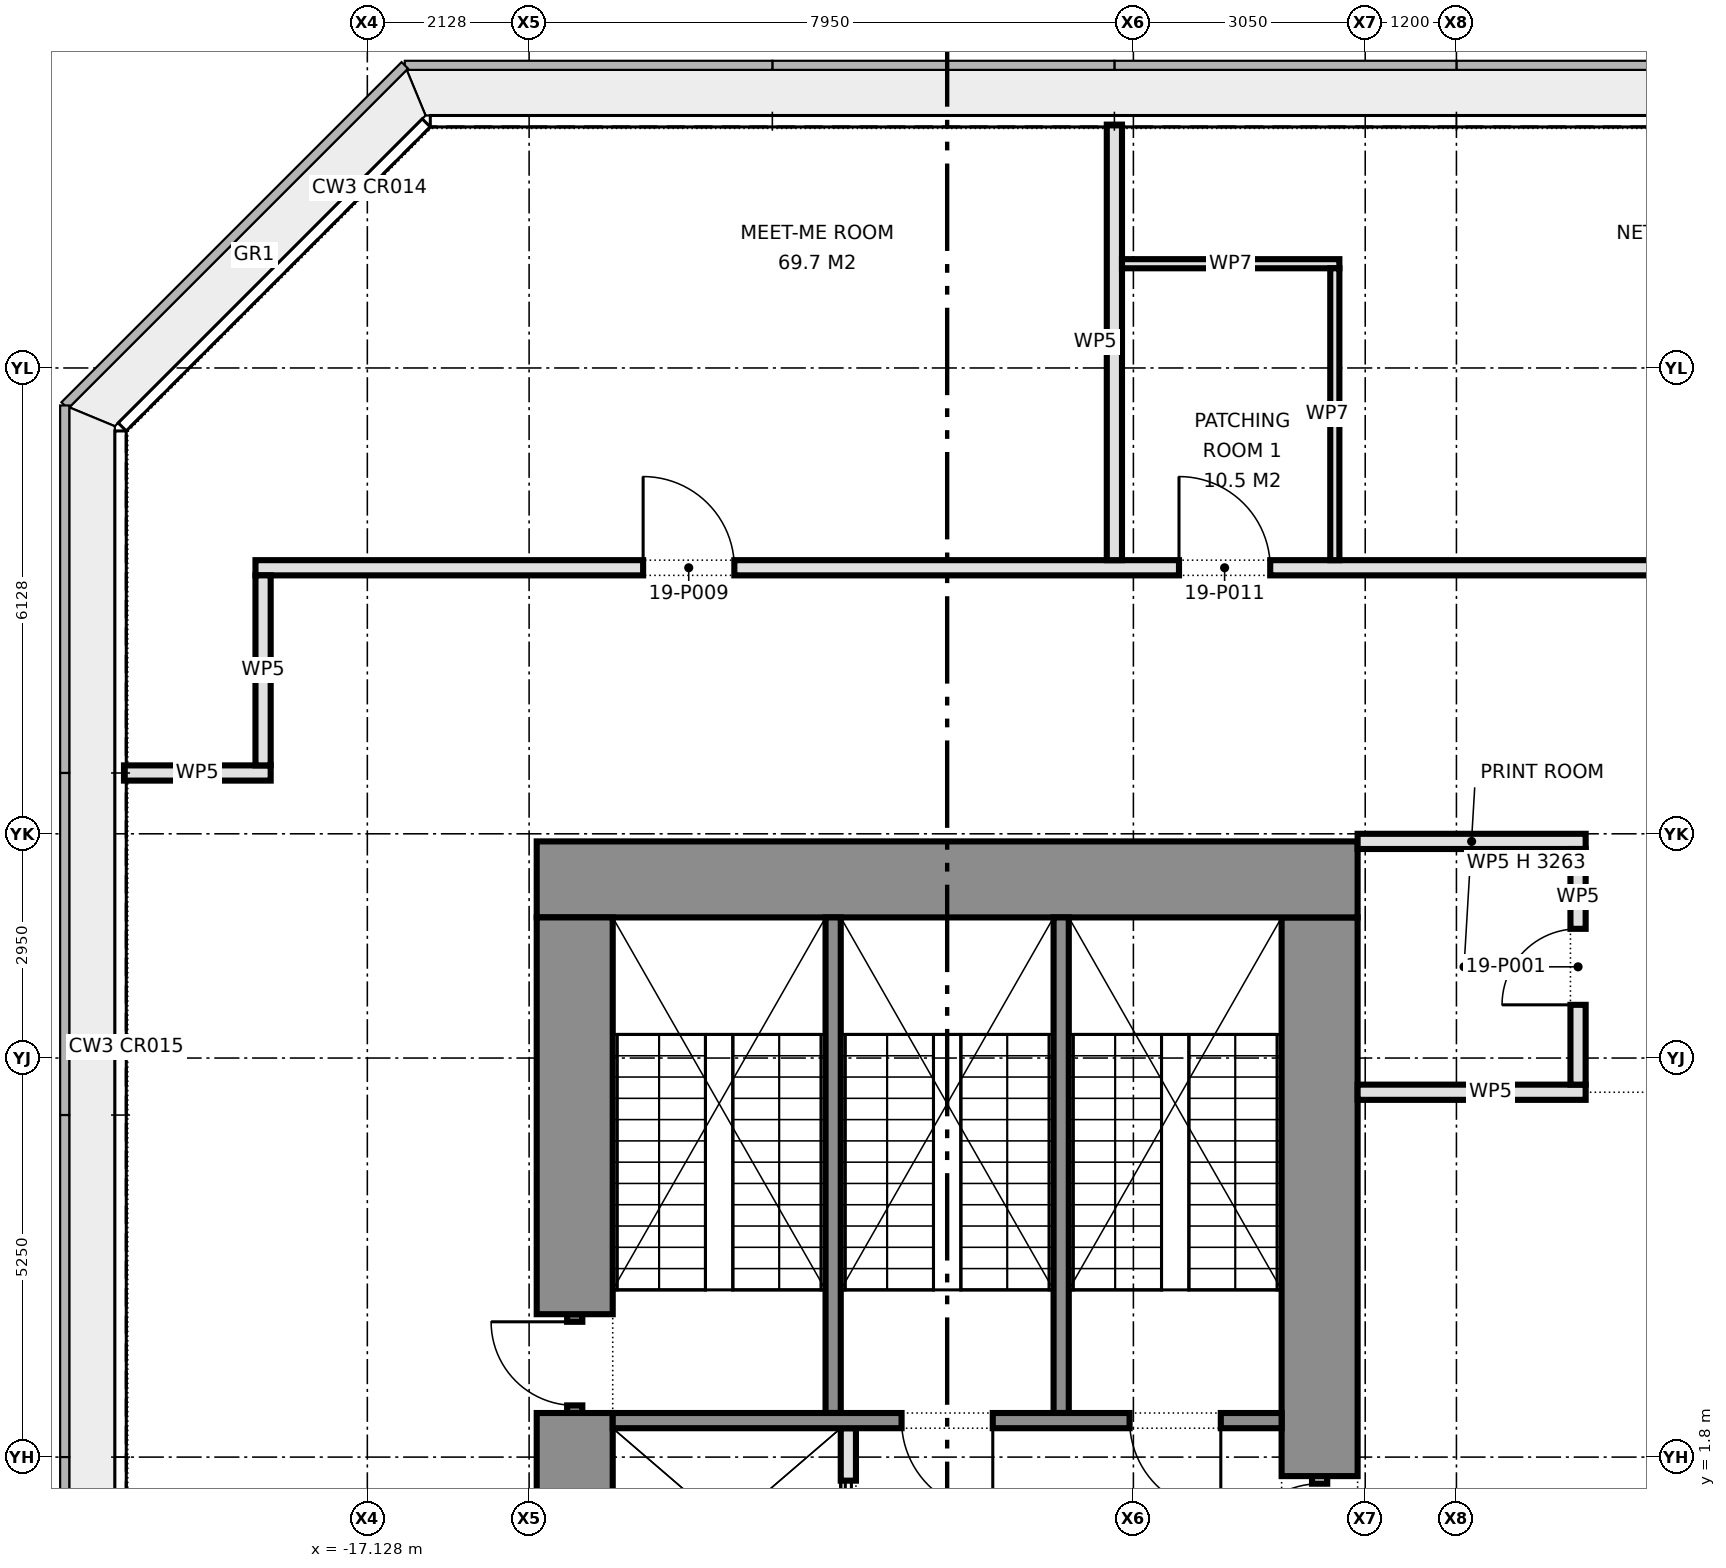
"""IFC4 building model, lengths in metres.
Left out: names, types, materials, properties, quantities, classifications, styles, units other than length and angle.
Written with IfcOpenShell. Run it as: python <this file> out.ifc"""

import sys

from ifc_helpers import new_model, si_unit, direction, frame, frame_2d, origin, place, context, subcontext, project, spatial, rectangle, extrude, element, fill, save


model = new_model("IFC4")
c1 = context("Model", 3, precision=1e-05, world=origin(), true_north=direction((0.0, 1.0)))
c2 = subcontext(c1, "Body", "Model", "MODEL_VIEW")
j1 = project(units=[si_unit("LENGTHUNIT", "METRE"), si_unit("PLANEANGLEUNIT", "RADIAN")], contexts=[c1])
p1 = place(None, origin())
s1 = spatial("IfcSite", under=j1, at=p1, CompositionType="ELEMENT")
p2 = place(p1, origin())
s2 = spatial("IfcBuilding", under=s1, at=p2, CompositionType="ELEMENT")
p3 = place(p2, frame((0.0, 0.0, 86.4)))
s3 = spatial("IfcBuildingStorey", under=s2, at=p3, CompositionType="ELEMENT", Elevation=86.4)
p4 = place(p3, frame((-14.9, 9.4, 0.0), z_axis=(0.0, 0.0, 1.0), x_axis=(1.0, 0.0, 0.0)))
e1 = element("IfcWall", 1, at=p4, inside=s3, PredefinedType="SHEAR", context=c2, shape_type="SweptSolid", body=[
    extrude(rectangle(XDim=10.8, YDim=1.0, at=frame_2d((5.4, 0.0))), origin(), (0.0, 0.0, 1.0), 4.2),
])
p5 = place(p3, frame((-14.4, -3.75, 0.0), z_axis=(0.0, 0.0, 1.0), x_axis=(0.0, 1.0, 0.0)))
e2 = element("IfcWall", 2, at=p5, inside=s3, PredefinedType="SHEAR", context=c2, shape_type="SweptSolid", body=[
    extrude(rectangle(XDim=6.13, YDim=1.0, at=frame_2d((3.065, 0.0))), origin(), (0.0, 0.0, 1.0), 4.2),
])
p6 = place(p3, frame((-14.4, 2.38, 0.0), z_axis=(0.0, 0.0, 1.0), x_axis=(0.0, 1.0, 0.0)))
e3 = element("IfcWall", 3, at=p6, inside=s3, PredefinedType="SHEAR", context=c2, shape_type="SweptSolid", body=[
    extrude(rectangle(XDim=1.3, YDim=0.2, at=frame_2d((0.65, 0.0))), origin(), (0.0, 0.0, 1.0), 2.4),
])
p7 = place(p6, frame((0.1, 0.0, 0.0)))
e4 = element("IfcOpeningElement", 4, at=p7, cuts=e3, PredefinedType="OPENING", context=c2, shape_type="SweptSolid", body=[
    extrude(rectangle(XDim=1.1, YDim=2.1, at=frame_2d((0.55, 1.05))), frame((0.0, 0.11, 0.0), z_axis=(0.0, -1.0, 0.0), x_axis=(1.0, 0.0, 0.0)), (0.0, 0.0, 1.0), 0.22),
])
p8 = place(p3, frame((-14.4, 3.68, 0.0), z_axis=(0.0, 0.0, 1.0), x_axis=(0.0, 1.0, 0.0)))
e5 = element("IfcWall", 5, at=p8, inside=s3, PredefinedType="SHEAR", context=c2, shape_type="SweptSolid", body=[
    extrude(rectangle(XDim=5.22, YDim=1.0, at=frame_2d((2.61, 0.0))), origin(), (0.0, 0.0, 1.0), 4.2),
])
p9 = place(p3, frame((-4.6, 0.25, 0.0), z_axis=(0.0, 0.0, 1.0), x_axis=(0.0, 1.0, 0.0)))
e6 = element("IfcWall", 6, at=p9, inside=s3, PredefinedType="PARTITIONING", context=c2, shape_type="SweptSolid", body=[
    extrude(rectangle(XDim=1.3, YDim=0.2, at=frame_2d((0.65, 0.0))), origin(), (0.0, 0.0, 1.0), 2.4),
])
p10 = place(p9, frame((0.1, 0.0, 0.0)))
e7 = element("IfcOpeningElement", 7, at=p10, cuts=e6, PredefinedType="OPENING", context=c2, shape_type="SweptSolid", body=[
    extrude(rectangle(XDim=1.1, YDim=2.1, at=frame_2d((0.55, 1.05))), frame((0.0, 0.11, 0.0), z_axis=(0.0, -1.0, 0.0), x_axis=(1.0, 0.0, 0.0)), (0.0, 0.0, 1.0), 0.22),
])
p11 = place(p3, frame((-4.6, 1.55, 0.0), z_axis=(0.0, 0.0, 1.0), x_axis=(0.0, 1.0, 0.0)))
e8 = element("IfcWall", 8, at=p11, inside=s3, PredefinedType="SHEAR", context=c2, shape_type="SweptSolid", body=[
    extrude(rectangle(XDim=7.35, YDim=1.0, at=frame_2d((3.675, 0.0))), origin(), (0.0, 0.0, 1.0), 4.2),
])
p12 = place(p3, frame((-10.8, -0.4, 0.0), z_axis=(0.0, 0.0, 1.0), x_axis=(0.0, 1.0, 0.0)))
e9 = element("IfcWall", 9, at=p12, inside=s3, PredefinedType="PARTITIONING", context=c2, shape_type="SweptSolid", body=[
    extrude(rectangle(XDim=2.58, YDim=0.2, at=frame_2d((1.29, 0.0))), origin(), (0.0, 0.0, 1.0), 4.2),
])
p13 = place(p12, frame((0.69, 0.0, 0.0)))
e10 = element("IfcOpeningElement", 10, at=p13, cuts=e9, PredefinedType="OPENING", context=c2, shape_type="SweptSolid", body=[
    extrude(rectangle(XDim=1.2, YDim=2.1, at=frame_2d((0.6, 1.05))), frame((0.0, 0.11, 0.0), z_axis=(0.0, -1.0, 0.0), x_axis=(1.0, 0.0, 0.0)), (0.0, 0.0, 1.0), 0.22),
])
p14 = place(p3, frame((-13.9, 2.28, 0.0), z_axis=(0.0, 0.0, 1.0), x_axis=(1.0, 0.0, 0.0)))
e11 = element("IfcWall", 11, at=p14, inside=s3, PredefinedType="SHEAR", context=c2, shape_type="SweptSolid", body=[
    extrude(rectangle(XDim=8.8, YDim=0.2, at=frame_2d((4.4, 0.0))), origin(), (0.0, 0.0, 1.0), 4.2),
])
p15 = place(p14, frame((3.8, 0.0, 0.0)))
e12 = element("IfcOpeningElement", 12, at=p15, cuts=e11, PredefinedType="OPENING", context=c2, shape_type="SweptSolid", body=[
    extrude(rectangle(XDim=1.2, YDim=2.1, at=frame_2d((0.6, 1.05))), frame((0.0, 0.11, 0.0), z_axis=(0.0, -1.0, 0.0), x_axis=(1.0, 0.0, 0.0)), (0.0, 0.0, 1.0), 0.22),
])
p16 = place(p14, frame((6.8, 0.0, 0.0)))
e13 = element("IfcOpeningElement", 13, at=p16, cuts=e11, PredefinedType="OPENING", context=c2, shape_type="SweptSolid", body=[
    extrude(rectangle(XDim=1.2, YDim=2.1, at=frame_2d((0.6, 1.05))), frame((0.0, 0.11, 0.0), z_axis=(0.0, -1.0, 0.0), x_axis=(1.0, 0.0, 0.0)), (0.0, 0.0, 1.0), 0.22),
])
for number, where, z_axis, x_axis in (
    (14, (-11.0, 2.38, 0.0), (0.0, 0.0, 1.0), (0.0, 1.0, 0.0)),
    (15, (-8.0, 2.38, 0.0), (0.0, 0.0, 1.0), (0.0, 1.0, 0.0)),
):
    element("IfcWall", number, at=place(p3, frame(where, z_axis=z_axis, x_axis=x_axis)), inside=s3, PredefinedType="SHEAR", context=c2, shape_type="SweptSolid", body=[
        extrude(rectangle(XDim=6.52, YDim=0.2, at=frame_2d((3.26, 0.0))), origin(), (0.0, 0.0, 1.0), 4.2),
    ])
p17 = place(p3, frame((-4.1, 6.6, 0.0), z_axis=(0.0, 0.0, 1.0), x_axis=(1.0, 0.0, 0.0)))
e16 = element("IfcWall", 16, at=p17, inside=s3, PredefinedType="PARTITIONING", context=c2, shape_type="SweptSolid", body=[
    extrude(rectangle(XDim=3.0, YDim=0.2, at=frame_2d((1.5, 0.0))), origin(), (0.0, 0.0, 1.0), 4.2),
])
p18 = place(p3, frame((-4.1, 9.9, 0.0), z_axis=(0.0, 0.0, 1.0), x_axis=(1.0, 0.0, 0.0)))
e17 = element("IfcWall", 17, at=p18, inside=s3, PredefinedType="PARTITIONING", context=c2, shape_type="SweptSolid", body=[
    extrude(rectangle(XDim=3.0, YDim=0.2, at=frame_2d((1.5, 0.0))), origin(), (0.0, 0.0, 1.0), 3.263),
])
p19 = place(p3, frame((-20.33, 10.8, 0.0), z_axis=(0.0, 0.0, 1.0), x_axis=(1.0, 0.0, 0.0)))
e18 = element("IfcWall", 18, at=p19, inside=s3, PredefinedType="PARTITIONING", context=c2, shape_type="SweptSolid", body=[
    extrude(rectangle(XDim=1.93, YDim=0.2, at=frame_2d((0.965, 0.0))), origin(), (0.0, 0.0, 1.0), 4.2),
])
p20 = place(p3, frame((-18.6, 13.5, 0.0), z_axis=(0.0, 0.0, 1.0), x_axis=(1.0, 0.0, 0.0)))
e19 = element("IfcWall", 19, at=p20, inside=s3, PredefinedType="PARTITIONING", context=c2, shape_type="SweptSolid", body=[
    extrude(rectangle(XDim=37.2, YDim=0.2, at=frame_2d((18.6, 0.0))), origin(), (0.0, 0.0, 1.0), 4.2),
])
p21 = place(p20, frame((5.1, 0.0, 0.0)))
e20 = element("IfcOpeningElement", 20, at=p21, cuts=e19, PredefinedType="OPENING", context=c2, shape_type="SweptSolid", body=[
    extrude(rectangle(XDim=1.2, YDim=2.1, at=frame_2d((0.6, 1.05))), frame((0.0, 0.11, 0.0), z_axis=(0.0, -1.0, 0.0), x_axis=(1.0, 0.0, 0.0)), (0.0, 0.0, 1.0), 0.22),
])
p22 = place(p20, frame((18.9, 0.0, 0.0)))
e21 = element("IfcOpeningElement", 21, at=p22, cuts=e19, PredefinedType="OPENING", context=c2, shape_type="SweptSolid", body=[
    extrude(rectangle(XDim=1.2, YDim=2.1, at=frame_2d((0.6, 1.05))), frame((0.0, 0.11, 0.0), z_axis=(0.0, -1.0, 0.0), x_axis=(1.0, 0.0, 0.0)), (0.0, 0.0, 1.0), 0.22),
])
p23 = place(p20, frame((12.15, 0.0, 0.0)))
e22 = element("IfcOpeningElement", 22, at=p23, cuts=e19, PredefinedType="OPENING", context=c2, shape_type="SweptSolid", body=[
    extrude(rectangle(XDim=1.2, YDim=2.1, at=frame_2d((0.6, 1.05))), frame((0.0, 0.11, 0.0), z_axis=(0.0, -1.0, 0.0), x_axis=(1.0, 0.0, 0.0)), (0.0, 0.0, 1.0), 0.22),
])
p24 = place(p20, frame((30.05, 0.0, 0.0)))
e23 = element("IfcOpeningElement", 23, at=p24, cuts=e19, PredefinedType="OPENING", context=c2, shape_type="SweptSolid", body=[
    extrude(rectangle(XDim=1.8, YDim=2.1, at=frame_2d((0.9, 1.05))), frame((0.0, 0.11, 0.0), z_axis=(0.0, -1.0, 0.0), x_axis=(1.0, 0.0, 0.0)), (0.0, 0.0, 1.0), 0.22),
])
p25 = place(p3, frame((-1.2, 6.7, 0.0), z_axis=(0.0, 0.0, 1.0), x_axis=(0.0, 1.0, 0.0)))
e24 = element("IfcWall", 24, at=p25, inside=s3, PredefinedType="PARTITIONING", context=c2, shape_type="SweptSolid", body=[
    extrude(rectangle(XDim=3.1, YDim=0.2, at=frame_2d((1.55, 0.0))), origin(), (0.0, 0.0, 1.0), 4.2),
])
p26 = place(p25, frame((1.05, 0.0, 0.0)))
e25 = element("IfcOpeningElement", 25, at=p26, cuts=e24, PredefinedType="OPENING", context=c2, shape_type="SweptSolid", body=[
    extrude(rectangle(XDim=1.0, YDim=2.1, at=frame_2d((0.5, 1.05))), frame((0.0, 0.11, 0.0), z_axis=(0.0, -1.0, 0.0), x_axis=(1.0, 0.0, 0.0)), (0.0, 0.0, 1.0), 0.22),
])
p27 = place(p3, frame((-7.3, 13.6, 0.0), z_axis=(0.0, 0.0, 1.0), x_axis=(0.0, 1.0, 0.0)))
e26 = element("IfcWall", 26, at=p27, inside=s3, PredefinedType="PARTITIONING", context=c2, shape_type="SweptSolid", body=[
    extrude(rectangle(XDim=5.73, YDim=0.2, at=frame_2d((2.865, 0.0))), origin(), (0.0, 0.0, 1.0), 4.2),
])
p28 = place(p3, frame((-18.5, 10.9, 0.0), z_axis=(0.0, 0.0, 1.0), x_axis=(0.0, 1.0, 0.0)))
e27 = element("IfcWall", 27, at=p28, inside=s3, PredefinedType="PARTITIONING", context=c2, shape_type="SweptSolid", body=[
    extrude(rectangle(XDim=2.5, YDim=0.2, at=frame_2d((1.25, 0.0))), origin(), (0.0, 0.0, 1.0), 4.2),
])
p29 = place(p3, frame((-7.2, 17.5, 0.0), z_axis=(0.0, 0.0, 1.0), x_axis=(1.0, 0.0, 0.0)))
e28 = element("IfcWall", 28, at=p29, inside=s3, PredefinedType="PARTITIONING", context=c2, shape_type="SweptSolid", body=[
    extrude(rectangle(XDim=2.86, YDim=0.12, at=frame_2d((1.43, 0.0))), origin(), (0.0, 0.0, 1.0), 4.2),
])
p30 = place(p3, frame((-4.4, 13.6, 0.0), z_axis=(0.0, 0.0, 1.0), x_axis=(0.0, 1.0, 0.0)))
e29 = element("IfcWall", 29, at=p30, inside=s3, PredefinedType="PARTITIONING", context=c2, shape_type="SweptSolid", body=[
    extrude(rectangle(XDim=3.84, YDim=0.12, at=frame_2d((1.92, 0.0))), origin(), (0.0, 0.0, 1.0), 4.2),
])
p31 = place(p7, origin())
e30 = element("IfcDoor", 30, at=p31, inside=s3, OperationType="SINGLE_SWING_RIGHT", PredefinedType="DOOR", context=c2, shape_type="SweptSolid", body=[
    extrude(rectangle(XDim=1.1, YDim=2.1, at=frame_2d((0.55, 1.05))), frame((0.0, 0.025, 0.0), z_axis=(0.0, -1.0, 0.0), x_axis=(1.0, 0.0, 0.0)), (0.0, 0.0, 1.0), 0.05),
])
fill(e4, e30)
p32 = place(p10, origin())
e31 = element("IfcDoor", 31, at=p32, inside=s3, OperationType="SINGLE_SWING_LEFT", PredefinedType="DOOR", context=c2, shape_type="SweptSolid", body=[
    extrude(rectangle(XDim=1.1, YDim=2.1, at=frame_2d((0.55, 1.05))), frame((0.0, 0.025, 0.0), z_axis=(0.0, -1.0, 0.0), x_axis=(1.0, 0.0, 0.0)), (0.0, 0.0, 1.0), 0.05),
])
fill(e7, e31)
p33 = place(p13, origin())
e32 = element("IfcDoor", 32, at=p33, inside=s3, OperationType="DOUBLE_DOOR_SLIDING", PredefinedType="DOOR", context=c2, shape_type="SweptSolid", body=[
    extrude(rectangle(XDim=1.2, YDim=2.1, at=frame_2d((0.6, 1.05))), frame((0.0, 0.025, 0.0), z_axis=(0.0, -1.0, 0.0), x_axis=(1.0, 0.0, 0.0)), (0.0, 0.0, 1.0), 0.05),
])
fill(e10, e32)
p34 = place(p15, frame((1.2, 0.0, 0.0), z_axis=(0.0, 0.0, 1.0), x_axis=(-1.0, 0.0, 0.0)))
e33 = element("IfcDoor", 33, at=p34, inside=s3, OperationType="SINGLE_SWING_LEFT", PredefinedType="DOOR", context=c2, shape_type="SweptSolid", body=[
    extrude(rectangle(XDim=1.2, YDim=2.1, at=frame_2d((0.6, 1.05))), frame((0.0, 0.025, 0.0), z_axis=(0.0, -1.0, 0.0), x_axis=(1.0, 0.0, 0.0)), (0.0, 0.0, 1.0), 0.05),
])
fill(e12, e33)
p35 = place(p16, frame((1.2, 0.0, 0.0), z_axis=(0.0, 0.0, 1.0), x_axis=(-1.0, 0.0, 0.0)))
e34 = element("IfcDoor", 34, at=p35, inside=s3, OperationType="SINGLE_SWING_LEFT", PredefinedType="DOOR", context=c2, shape_type="SweptSolid", body=[
    extrude(rectangle(XDim=1.2, YDim=2.1, at=frame_2d((0.6, 1.05))), frame((0.0, 0.025, 0.0), z_axis=(0.0, -1.0, 0.0), x_axis=(1.0, 0.0, 0.0)), (0.0, 0.0, 1.0), 0.05),
])
fill(e13, e34)
p36 = place(p26, origin())
e35 = element("IfcDoor", 35, at=p36, inside=s3, OperationType="SINGLE_SWING_LEFT", PredefinedType="DOOR", context=c2, shape_type="SweptSolid", body=[
    extrude(rectangle(XDim=1.0, YDim=2.1, at=frame_2d((0.5, 1.05))), frame((0.0, 0.025, 0.0), z_axis=(0.0, -1.0, 0.0), x_axis=(1.0, 0.0, 0.0)), (0.0, 0.0, 1.0), 0.05),
])
fill(e25, e35)
p37 = place(p21, origin())
e36 = element("IfcDoor", 36, at=p37, inside=s3, OperationType="SINGLE_SWING_LEFT", PredefinedType="DOOR", context=c2, shape_type="SweptSolid", body=[
    extrude(rectangle(XDim=1.2, YDim=2.1, at=frame_2d((0.6, 1.05))), frame((0.0, 0.025, 0.0), z_axis=(0.0, -1.0, 0.0), x_axis=(1.0, 0.0, 0.0)), (0.0, 0.0, 1.0), 0.05),
])
fill(e20, e36)
p38 = place(p23, origin())
e37 = element("IfcDoor", 37, at=p38, inside=s3, OperationType="SINGLE_SWING_LEFT", PredefinedType="DOOR", context=c2, shape_type="SweptSolid", body=[
    extrude(rectangle(XDim=1.2, YDim=2.1, at=frame_2d((0.6, 1.05))), frame((0.0, 0.025, 0.0), z_axis=(0.0, -1.0, 0.0), x_axis=(1.0, 0.0, 0.0)), (0.0, 0.0, 1.0), 0.05),
])
fill(e22, e37)
save(model, sys.argv[1])
